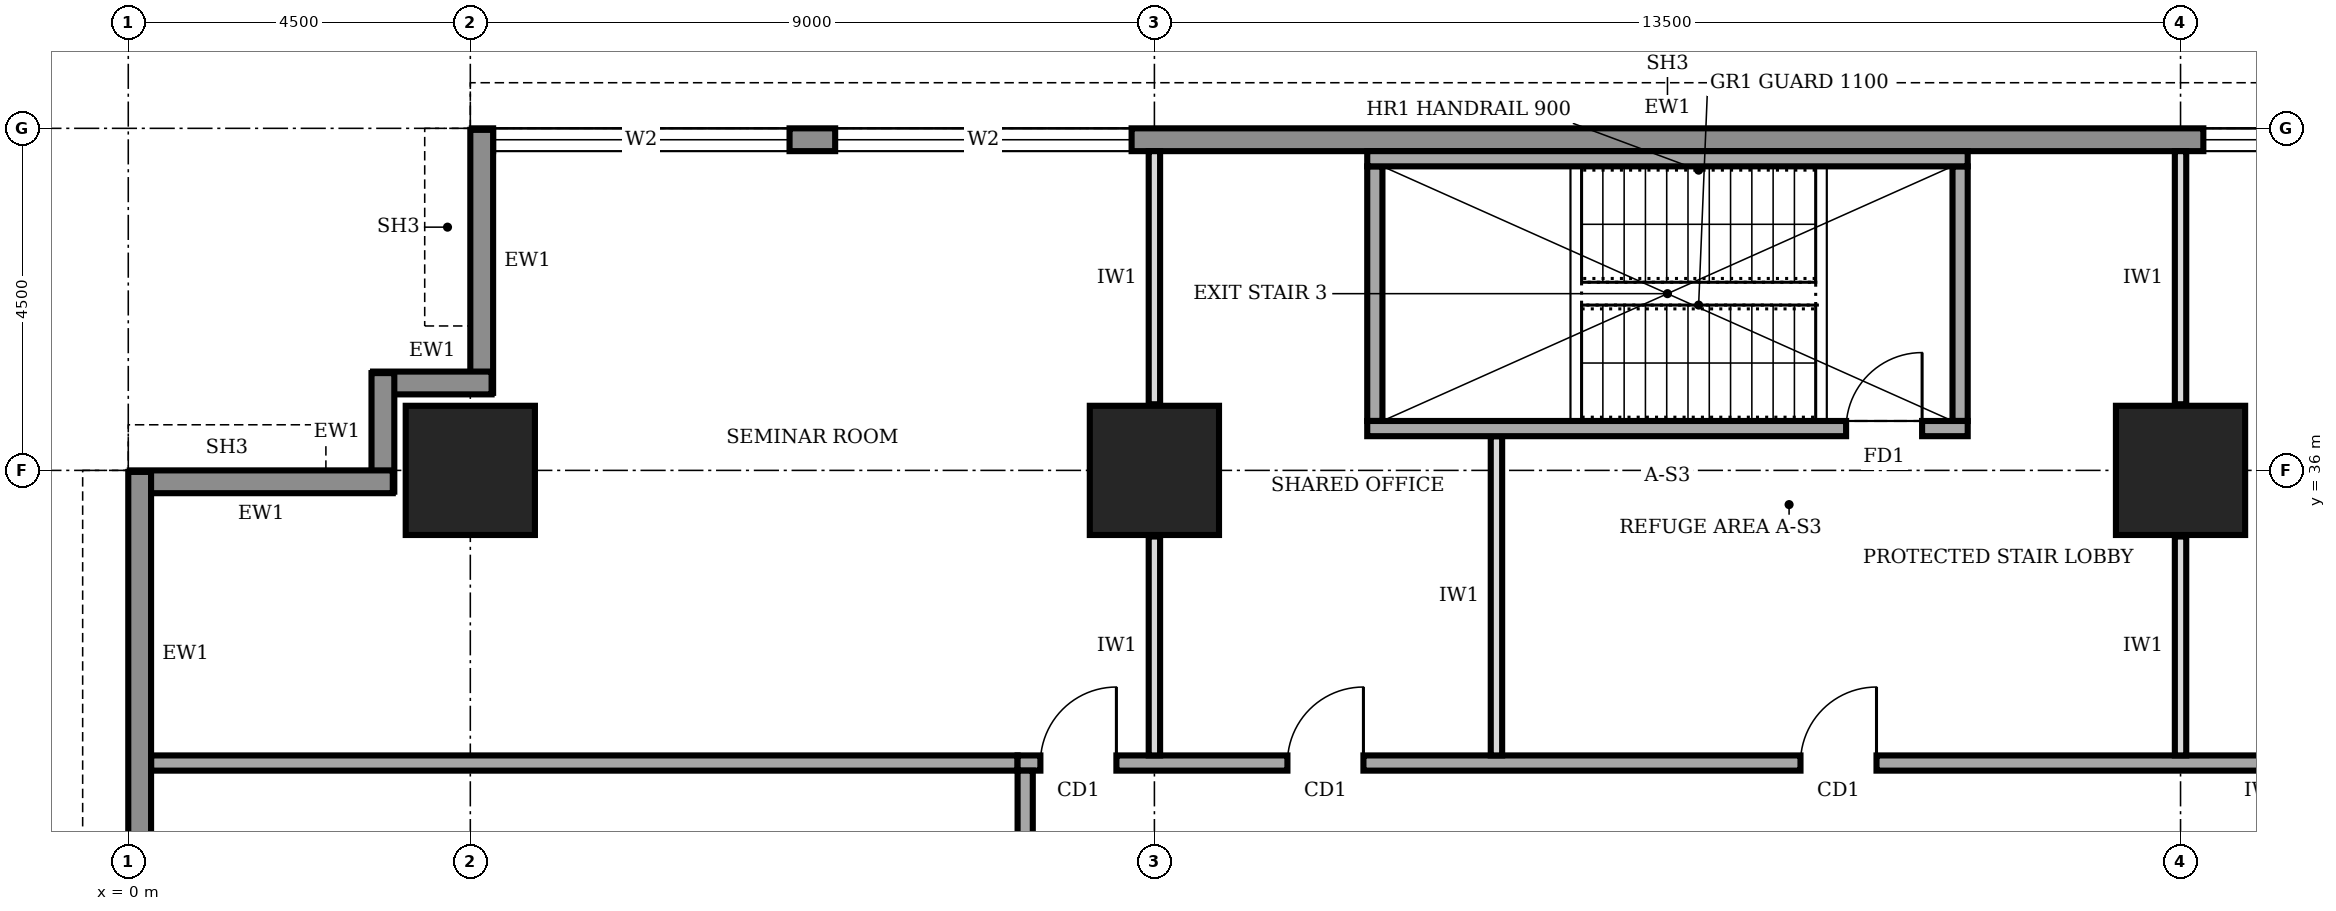
"""IFC4 building model, lengths in metres.
Left out: names, types, materials, properties, quantities, classifications, styles, units other than length and angle.
Written with IfcOpenShell. Run it as: python <this file> out.ifc"""

import sys

from ifc_helpers import new_model, si_unit, direction, frame, frame_2d, origin, origin_2d, place, context, subcontext, project, spatial, rectangle, extrude, element, fill, save


model = new_model("IFC4")
c1 = context("Model", 3, precision=1e-05, world=origin(), true_north=direction((0.0, 1.0)))
c2 = subcontext(c1, "Body", "Model", "MODEL_VIEW")
j1 = project(units=[si_unit("LENGTHUNIT", "METRE"), si_unit("PLANEANGLEUNIT", "RADIAN")], contexts=[c1])
p1 = place(None, origin())
s1 = spatial("IfcSite", under=j1, at=p1, CompositionType="ELEMENT")
p2 = place(p1, origin())
s2 = spatial("IfcBuilding", under=s1, at=p2, CompositionType="ELEMENT")
p3 = place(p2, frame((0.0, 0.0, 161.0)))
s3 = spatial("IfcBuildingStorey", under=s2, at=p3, CompositionType="ELEMENT", Elevation=161.0)
for number, where, z_axis, x_axis in (
    (1, (4.5, 36.0, 0.0), (0.0, 0.0, 1.0), (1.0, 0.0, 0.0)),
    (2, (13.5, 36.0, 0.0), (0.0, 0.0, 1.0), (1.0, 0.0, 0.0)),
    (3, (27.0, 36.0, 0.0), (0.0, 0.0, 1.0), (1.0, 0.0, 0.0)),
):
    element("IfcColumn", number, at=place(p3, frame(where, z_axis=z_axis, x_axis=x_axis)), inside=s3, PredefinedType="COLUMN", context=c2, shape_type="SweptSolid", body=[
        extrude(rectangle(XDim=1.7, YDim=1.7, at=origin_2d()), origin(), (0.0, 0.0, 1.0), 4.0),
    ])
p4 = place(p3, frame((35.98, 40.35, 0.0), z_axis=(0.0, 0.0, 1.0), x_axis=(-1.0, 0.0, 0.0)))
e4 = element("IfcWall", 4, at=p4, inside=s3, PredefinedType="STANDARD", context=c2, shape_type="SweptSolid", body=[
    extrude(rectangle(XDim=31.46, YDim=0.3, at=frame_2d((15.73, 0.0))), origin(), (0.0, 0.0, 1.0), 3.75),
])
p5 = place(p4, frame((27.28, 0.0, 0.6)))
e5 = element("IfcOpeningElement", 5, at=p5, cuts=e4, PredefinedType="OPENING", context=c2, shape_type="SweptSolid", body=[
    extrude(rectangle(XDim=3.9, YDim=2.6, at=frame_2d((1.95, 1.3))), frame((0.0, 0.16, 0.0), z_axis=(0.0, -1.0, 0.0), x_axis=(1.0, 0.0, 0.0)), (0.0, 0.0, 1.0), 0.32),
])
p6 = place(p4, frame((22.78, 0.0, 0.6)))
e6 = element("IfcOpeningElement", 6, at=p6, cuts=e4, PredefinedType="OPENING", context=c2, shape_type="SweptSolid", body=[
    extrude(rectangle(XDim=3.9, YDim=2.6, at=frame_2d((1.95, 1.3))), frame((0.0, 0.16, 0.0), z_axis=(0.0, -1.0, 0.0), x_axis=(1.0, 0.0, 0.0)), (0.0, 0.0, 1.0), 0.32),
])
p7 = place(p4, frame((4.78, 0.0, 0.6)))
e7 = element("IfcOpeningElement", 7, at=p7, cuts=e4, PredefinedType="OPENING", context=c2, shape_type="SweptSolid", body=[
    extrude(rectangle(XDim=3.9, YDim=2.6, at=frame_2d((1.95, 1.3))), frame((0.0, 0.16, 0.0), z_axis=(0.0, -1.0, 0.0), x_axis=(1.0, 0.0, 0.0)), (0.0, 0.0, 1.0), 0.32),
])
p8 = place(p3, frame((4.65, 40.48, 0.0), z_axis=(0.0, 0.0, 1.0), x_axis=(0.0, -1.0, 0.0)))
e8 = element("IfcWall", 8, at=p8, inside=s3, PredefinedType="STANDARD", context=c2, shape_type="SweptSolid", body=[
    extrude(rectangle(XDim=3.46, YDim=0.3, at=frame_2d((1.73, 0.0))), origin(), (0.0, 0.0, 1.0), 2.85),
])
for number, where, z_axis, x_axis in (
    (9, (4.78, 37.15, 0.0), (0.0, 0.0, 1.0), (-1.0, 0.0, 0.0)),
    (10, (3.35, 37.28, 0.0), (0.0, 0.0, 1.0), (0.0, -1.0, 0.0)),
):
    element("IfcWall", number, at=place(p3, frame(where, z_axis=z_axis, x_axis=x_axis)), inside=s3, PredefinedType="STANDARD", context=c2, shape_type="SweptSolid", body=[
        extrude(rectangle(XDim=1.56, YDim=0.3, at=frame_2d((0.78, 0.0))), origin(), (0.0, 0.0, 1.0), 3.75),
    ])
p9 = place(p3, frame((3.48, 35.85, 0.0), z_axis=(0.0, 0.0, 1.0), x_axis=(-1.0, 0.0, 0.0)))
e11 = element("IfcWall", 11, at=p9, inside=s3, PredefinedType="STANDARD", context=c2, shape_type="SweptSolid", body=[
    extrude(rectangle(XDim=3.46, YDim=0.3, at=frame_2d((1.73, 0.0))), origin(), (0.0, 0.0, 1.0), 2.85),
])
p10 = place(p3, frame((0.15, 35.98, 0.0), z_axis=(0.0, 0.0, 1.0), x_axis=(0.0, -1.0, 0.0)))
e12 = element("IfcWall", 12, at=p10, inside=s3, PredefinedType="STANDARD", context=c2, shape_type="SweptSolid", body=[
    extrude(rectangle(XDim=31.46, YDim=0.3, at=frame_2d((15.73, 0.0))), origin(), (0.0, 0.0, 1.0), 3.75),
])
p11 = place(p10, frame((27.28, 0.0, 0.6)))
e13 = element("IfcOpeningElement", 13, at=p11, cuts=e12, PredefinedType="OPENING", context=c2, shape_type="SweptSolid", body=[
    extrude(rectangle(XDim=3.9, YDim=2.6, at=frame_2d((1.95, 1.3))), frame((0.0, 0.16, 0.0), z_axis=(0.0, -1.0, 0.0), x_axis=(1.0, 0.0, 0.0)), (0.0, 0.0, 1.0), 0.32),
])
p12 = place(p10, frame((22.78, 0.0, 0.6)))
e14 = element("IfcOpeningElement", 14, at=p12, cuts=e12, PredefinedType="OPENING", context=c2, shape_type="SweptSolid", body=[
    extrude(rectangle(XDim=3.9, YDim=2.6, at=frame_2d((1.95, 1.3))), frame((0.0, 0.16, 0.0), z_axis=(0.0, -1.0, 0.0), x_axis=(1.0, 0.0, 0.0)), (0.0, 0.0, 1.0), 0.32),
])
p13 = place(p10, frame((18.28, 0.0, 0.6)))
e15 = element("IfcOpeningElement", 15, at=p13, cuts=e12, PredefinedType="OPENING", context=c2, shape_type="SweptSolid", body=[
    extrude(rectangle(XDim=3.9, YDim=2.6, at=frame_2d((1.95, 1.3))), frame((0.0, 0.16, 0.0), z_axis=(0.0, -1.0, 0.0), x_axis=(1.0, 0.0, 0.0)), (0.0, 0.0, 1.0), 0.32),
])
p14 = place(p10, frame((13.78, 0.0, 0.6)))
e16 = element("IfcOpeningElement", 16, at=p14, cuts=e12, PredefinedType="OPENING", context=c2, shape_type="SweptSolid", body=[
    extrude(rectangle(XDim=3.9, YDim=2.6, at=frame_2d((1.95, 1.3))), frame((0.0, 0.16, 0.0), z_axis=(0.0, -1.0, 0.0), x_axis=(1.0, 0.0, 0.0)), (0.0, 0.0, 1.0), 0.32),
])
p15 = place(p10, frame((9.28, 0.0, 0.6)))
e17 = element("IfcOpeningElement", 17, at=p15, cuts=e12, PredefinedType="OPENING", context=c2, shape_type="SweptSolid", body=[
    extrude(rectangle(XDim=3.9, YDim=2.6, at=frame_2d((1.95, 1.3))), frame((0.0, 0.16, 0.0), z_axis=(0.0, -1.0, 0.0), x_axis=(1.0, 0.0, 0.0)), (0.0, 0.0, 1.0), 0.32),
])
p16 = place(p10, frame((4.78, 0.0, 0.6)))
e18 = element("IfcOpeningElement", 18, at=p16, cuts=e12, PredefinedType="OPENING", context=c2, shape_type="SweptSolid", body=[
    extrude(rectangle(XDim=3.9, YDim=2.6, at=frame_2d((1.95, 1.3))), frame((0.0, 0.16, 0.0), z_axis=(0.0, -1.0, 0.0), x_axis=(1.0, 0.0, 0.0)), (0.0, 0.0, 1.0), 0.32),
])
p17 = place(p3, frame((40.2, 32.15, 0.0), z_axis=(0.0, 0.0, 1.0), x_axis=(-1.0, 0.0, 0.0)))
e19 = element("IfcWall", 19, at=p17, inside=s3, PredefinedType="SOLIDWALL", context=c2, shape_type="SweptSolid", body=[
    extrude(rectangle(XDim=28.5, YDim=0.2, at=frame_2d((14.25, 0.0))), origin(), (0.0, 0.0, 1.0), 3.75),
])
p18 = place(p17, frame((27.2, 0.0, 0.0)))
e20 = element("IfcOpeningElement", 20, at=p18, cuts=e19, PredefinedType="OPENING", context=c2, shape_type="SweptSolid", body=[
    extrude(rectangle(XDim=1.0, YDim=2.1, at=frame_2d((0.5, 1.05))), frame((0.0, 0.11, 0.0), z_axis=(0.0, -1.0, 0.0), x_axis=(1.0, 0.0, 0.0)), (0.0, 0.0, 1.0), 0.22),
])
p19 = place(p17, frame((23.95, 0.0, 0.0)))
e21 = element("IfcOpeningElement", 21, at=p19, cuts=e19, PredefinedType="OPENING", context=c2, shape_type="SweptSolid", body=[
    extrude(rectangle(XDim=1.0, YDim=2.1, at=frame_2d((0.5, 1.05))), frame((0.0, 0.11, 0.0), z_axis=(0.0, -1.0, 0.0), x_axis=(1.0, 0.0, 0.0)), (0.0, 0.0, 1.0), 0.22),
])
p20 = place(p17, frame((17.2, 0.0, 0.0)))
e22 = element("IfcOpeningElement", 22, at=p20, cuts=e19, PredefinedType="OPENING", context=c2, shape_type="SweptSolid", body=[
    extrude(rectangle(XDim=1.0, YDim=2.1, at=frame_2d((0.5, 1.05))), frame((0.0, 0.11, 0.0), z_axis=(0.0, -1.0, 0.0), x_axis=(1.0, 0.0, 0.0)), (0.0, 0.0, 1.0), 0.22),
])
p21 = place(p17, frame((6.0, 0.0, 0.0)))
e23 = element("IfcOpeningElement", 23, at=p21, cuts=e19, PredefinedType="OPENING", context=c2, shape_type="SweptSolid", body=[
    extrude(rectangle(XDim=1.0, YDim=2.1, at=frame_2d((0.5, 1.05))), frame((0.0, 0.11, 0.0), z_axis=(0.0, -1.0, 0.0), x_axis=(1.0, 0.0, 0.0)), (0.0, 0.0, 1.0), 0.22),
])
p22 = place(p3, frame((11.8, 32.05, 0.0), z_axis=(0.0, 0.0, 1.0), x_axis=(0.0, -1.0, 0.0)))
e24 = element("IfcWall", 24, at=p22, inside=s3, PredefinedType="SOLIDWALL", context=c2, shape_type="SweptSolid", body=[
    extrude(rectangle(XDim=23.8, YDim=0.2, at=frame_2d((11.9, 0.0))), origin(), (0.0, 0.0, 1.0), 3.75),
])
p23 = place(p22, frame((20.675, 0.0, 0.0)))
e25 = element("IfcOpeningElement", 25, at=p23, cuts=e24, PredefinedType="OPENING", context=c2, shape_type="SweptSolid", body=[
    extrude(rectangle(XDim=1.0, YDim=2.1, at=frame_2d((0.5, 1.05))), frame((0.0, 0.11, 0.0), z_axis=(0.0, -1.0, 0.0), x_axis=(1.0, 0.0, 0.0)), (0.0, 0.0, 1.0), 0.22),
])
p24 = place(p22, frame((16.95, 0.0, 0.0)))
e26 = element("IfcOpeningElement", 26, at=p24, cuts=e24, PredefinedType="OPENING", context=c2, shape_type="SweptSolid", body=[
    extrude(rectangle(XDim=1.0, YDim=2.1, at=frame_2d((0.5, 1.05))), frame((0.0, 0.11, 0.0), z_axis=(0.0, -1.0, 0.0), x_axis=(1.0, 0.0, 0.0)), (0.0, 0.0, 1.0), 0.22),
])
p25 = place(p22, frame((13.95, 0.0, 0.0)))
e27 = element("IfcOpeningElement", 27, at=p25, cuts=e24, PredefinedType="OPENING", context=c2, shape_type="SweptSolid", body=[
    extrude(rectangle(XDim=0.9, YDim=2.1, at=frame_2d((0.45, 1.05))), frame((0.0, 0.11, 0.0), z_axis=(0.0, -1.0, 0.0), x_axis=(1.0, 0.0, 0.0)), (0.0, 0.0, 1.0), 0.22),
])
p26 = place(p22, frame((10.9, 0.0, 0.0)))
e28 = element("IfcOpeningElement", 28, at=p26, cuts=e24, PredefinedType="OPENING", context=c2, shape_type="SweptSolid", body=[
    extrude(rectangle(XDim=0.9, YDim=2.1, at=frame_2d((0.45, 1.05))), frame((0.0, 0.11, 0.0), z_axis=(0.0, -1.0, 0.0), x_axis=(1.0, 0.0, 0.0)), (0.0, 0.0, 1.0), 0.22),
])
p27 = place(p22, frame((6.2, 0.0, 0.0)))
e29 = element("IfcOpeningElement", 29, at=p27, cuts=e24, PredefinedType="OPENING", context=c2, shape_type="SweptSolid", body=[
    extrude(rectangle(XDim=0.9, YDim=2.1, at=frame_2d((0.45, 1.05))), frame((0.0, 0.11, 0.0), z_axis=(0.0, -1.0, 0.0), x_axis=(1.0, 0.0, 0.0)), (0.0, 0.0, 1.0), 0.22),
])
p28 = place(p22, frame((8.75, 0.0, 0.0)))
e30 = element("IfcOpeningElement", 30, at=p28, cuts=e24, PredefinedType="OPENING", context=c2, shape_type="SweptSolid", body=[
    extrude(rectangle(XDim=1.0, YDim=2.1, at=frame_2d((0.5, 1.05))), frame((0.0, 0.11, 0.0), z_axis=(0.0, -1.0, 0.0), x_axis=(1.0, 0.0, 0.0)), (0.0, 0.0, 1.0), 0.22),
])
p29 = place(p22, frame((1.925, 0.0, 0.0)))
e31 = element("IfcOpeningElement", 31, at=p29, cuts=e24, PredefinedType="OPENING", context=c2, shape_type="SweptSolid", body=[
    extrude(rectangle(XDim=1.0, YDim=2.1, at=frame_2d((0.5, 1.05))), frame((0.0, 0.11, 0.0), z_axis=(0.0, -1.0, 0.0), x_axis=(1.0, 0.0, 0.0)), (0.0, 0.0, 1.0), 0.22),
])
p30 = place(p3, frame((0.3, 32.15, 0.0), z_axis=(0.0, 0.0, 1.0), x_axis=(1.0, 0.0, 0.0)))
e32 = element("IfcWall", 32, at=p30, inside=s3, PredefinedType="SOLIDWALL", context=c2, shape_type="SweptSolid", body=[
    extrude(rectangle(XDim=11.4, YDim=0.2, at=frame_2d((5.7, 0.0))), origin(), (0.0, 0.0, 1.0), 3.75),
])
p31 = place(p3, frame((13.5, 32.25, 0.0), z_axis=(0.0, 0.0, 1.0), x_axis=(0.0, 1.0, 0.0)))
e33 = element("IfcWall", 33, at=p31, inside=s3, PredefinedType="PARTITIONING", context=c2, shape_type="SweptSolid", body=[
    extrude(rectangle(XDim=2.88, YDim=0.15, at=frame_2d((1.44, 0.0))), origin(), (0.0, 0.0, 1.0), 2.85),
])
p32 = place(p3, frame((13.5, 36.87, 0.0), z_axis=(0.0, 0.0, 1.0), x_axis=(0.0, 1.0, 0.0)))
e34 = element("IfcWall", 34, at=p32, inside=s3, PredefinedType="PARTITIONING", context=c2, shape_type="SweptSolid", body=[
    extrude(rectangle(XDim=3.33, YDim=0.15, at=frame_2d((1.665, 0.0))), origin(), (0.0, 0.0, 1.0), 2.85),
])
p33 = place(p3, frame((18.0, 32.25, 0.0), z_axis=(0.0, 0.0, 1.0), x_axis=(0.0, 1.0, 0.0)))
e35 = element("IfcWall", 35, at=p33, inside=s3, PredefinedType="PARTITIONING", context=c2, shape_type="SweptSolid", body=[
    extrude(rectangle(XDim=4.2, YDim=0.15, at=frame_2d((2.1, 0.0))), origin(), (0.0, 0.0, 1.0), 3.75),
])
p34 = place(p3, frame((27.0, 32.25, 0.0), z_axis=(0.0, 0.0, 1.0), x_axis=(0.0, 1.0, 0.0)))
e36 = element("IfcWall", 36, at=p34, inside=s3, PredefinedType="PARTITIONING", context=c2, shape_type="SweptSolid", body=[
    extrude(rectangle(XDim=2.88, YDim=0.15, at=frame_2d((1.44, 0.0))), origin(), (0.0, 0.0, 1.0), 2.85),
])
p35 = place(p3, frame((27.0, 36.87, 0.0), z_axis=(0.0, 0.0, 1.0), x_axis=(0.0, 1.0, 0.0)))
e37 = element("IfcWall", 37, at=p35, inside=s3, PredefinedType="PARTITIONING", context=c2, shape_type="SweptSolid", body=[
    extrude(rectangle(XDim=3.33, YDim=0.15, at=frame_2d((1.665, 0.0))), origin(), (0.0, 0.0, 1.0), 2.85),
])
p36 = place(p3, frame((16.3, 36.55, 0.0), z_axis=(0.0, 0.0, 1.0), x_axis=(1.0, 0.0, 0.0)))
e38 = element("IfcWall", 38, at=p36, inside=s3, PredefinedType="SOLIDWALL", context=c2, shape_type="SweptSolid", body=[
    extrude(rectangle(XDim=7.9, YDim=0.2, at=frame_2d((3.95, 0.0))), origin(), (0.0, 0.0, 1.0), 3.75),
])
p37 = place(p36, frame((6.3, 0.0, 0.0)))
e39 = element("IfcOpeningElement", 39, at=p37, cuts=e38, PredefinedType="OPENING", context=c2, shape_type="SweptSolid", body=[
    extrude(rectangle(XDim=1.0, YDim=2.1, at=frame_2d((0.5, 1.05))), frame((0.0, 0.11, 0.0), z_axis=(0.0, -1.0, 0.0), x_axis=(1.0, 0.0, 0.0)), (0.0, 0.0, 1.0), 0.22),
])
p38 = place(p3, frame((16.3, 40.1, 0.0), z_axis=(0.0, 0.0, 1.0), x_axis=(1.0, 0.0, 0.0)))
e40 = element("IfcWall", 40, at=p38, inside=s3, PredefinedType="SOLIDWALL", context=c2, shape_type="SweptSolid", body=[
    extrude(rectangle(XDim=7.9, YDim=0.2, at=frame_2d((3.95, 0.0))), origin(), (0.0, 0.0, 1.0), 3.75),
])
for number, where, z_axis, x_axis in (
    (41, (16.4, 36.65, 0.0), (0.0, 0.0, 1.0), (0.0, 1.0, 0.0)),
    (42, (24.1, 36.65, 0.0), (0.0, 0.0, 1.0), (0.0, 1.0, 0.0)),
):
    element("IfcWall", number, at=place(p3, frame(where, z_axis=z_axis, x_axis=x_axis)), inside=s3, PredefinedType="SOLIDWALL", context=c2, shape_type="SweptSolid", body=[
        extrude(rectangle(XDim=3.35, YDim=0.2, at=frame_2d((1.675, 0.0))), origin(), (0.0, 0.0, 1.0), 3.75),
    ])
p39 = place(p5, origin())
e43 = element("IfcWindow", 43, at=p39, inside=s3, PartitioningType="SINGLE_PANEL", PredefinedType="WINDOW", context=c2, shape_type="SweptSolid", body=[
    extrude(rectangle(XDim=3.9, YDim=2.6, at=frame_2d((1.95, 1.3))), frame((0.0, 0.03, 0.0), z_axis=(0.0, -1.0, 0.0), x_axis=(1.0, 0.0, 0.0)), (0.0, 0.0, 1.0), 0.06),
])
fill(e5, e43)
p40 = place(p6, origin())
e44 = element("IfcWindow", 44, at=p40, inside=s3, PartitioningType="SINGLE_PANEL", PredefinedType="WINDOW", context=c2, shape_type="SweptSolid", body=[
    extrude(rectangle(XDim=3.9, YDim=2.6, at=frame_2d((1.95, 1.3))), frame((0.0, 0.03, 0.0), z_axis=(0.0, -1.0, 0.0), x_axis=(1.0, 0.0, 0.0)), (0.0, 0.0, 1.0), 0.06),
])
fill(e6, e44)
p41 = place(p7, origin())
e45 = element("IfcWindow", 45, at=p41, inside=s3, PartitioningType="SINGLE_PANEL", PredefinedType="WINDOW", context=c2, shape_type="SweptSolid", body=[
    extrude(rectangle(XDim=3.9, YDim=2.6, at=frame_2d((1.95, 1.3))), frame((0.0, 0.03, 0.0), z_axis=(0.0, -1.0, 0.0), x_axis=(1.0, 0.0, 0.0)), (0.0, 0.0, 1.0), 0.06),
])
fill(e7, e45)
p42 = place(p18, frame((1.0, 0.0, 0.0), z_axis=(0.0, 0.0, 1.0), x_axis=(-1.0, 0.0, 0.0)))
e46 = element("IfcDoor", 46, at=p42, inside=s3, OperationType="SINGLE_SWING_RIGHT", PredefinedType="DOOR", context=c2, shape_type="SweptSolid", body=[
    extrude(rectangle(XDim=1.0, YDim=2.1, at=frame_2d((0.5, 1.05))), frame((0.0, 0.025, 0.0), z_axis=(0.0, -1.0, 0.0), x_axis=(1.0, 0.0, 0.0)), (0.0, 0.0, 1.0), 0.05),
])
fill(e20, e46)
p43 = place(p19, frame((1.0, 0.0, 0.0), z_axis=(0.0, 0.0, 1.0), x_axis=(-1.0, 0.0, 0.0)))
e47 = element("IfcDoor", 47, at=p43, inside=s3, OperationType="SINGLE_SWING_RIGHT", PredefinedType="DOOR", context=c2, shape_type="SweptSolid", body=[
    extrude(rectangle(XDim=1.0, YDim=2.1, at=frame_2d((0.5, 1.05))), frame((0.0, 0.025, 0.0), z_axis=(0.0, -1.0, 0.0), x_axis=(1.0, 0.0, 0.0)), (0.0, 0.0, 1.0), 0.05),
])
fill(e21, e47)
p44 = place(p20, frame((1.0, 0.0, 0.0), z_axis=(0.0, 0.0, 1.0), x_axis=(-1.0, 0.0, 0.0)))
e48 = element("IfcDoor", 48, at=p44, inside=s3, OperationType="SINGLE_SWING_RIGHT", PredefinedType="DOOR", context=c2, shape_type="SweptSolid", body=[
    extrude(rectangle(XDim=1.0, YDim=2.1, at=frame_2d((0.5, 1.05))), frame((0.0, 0.025, 0.0), z_axis=(0.0, -1.0, 0.0), x_axis=(1.0, 0.0, 0.0)), (0.0, 0.0, 1.0), 0.05),
])
fill(e22, e48)
p45 = place(p37, origin())
e49 = element("IfcDoor", 49, at=p45, inside=s3, OperationType="SINGLE_SWING_RIGHT", PredefinedType="DOOR", context=c2, shape_type="SweptSolid", body=[
    extrude(rectangle(XDim=1.0, YDim=2.1, at=frame_2d((0.5, 1.05))), frame((0.0, 0.025, 0.0), z_axis=(0.0, -1.0, 0.0), x_axis=(1.0, 0.0, 0.0)), (0.0, 0.0, 1.0), 0.05),
])
fill(e39, e49)
save(model, sys.argv[1])
